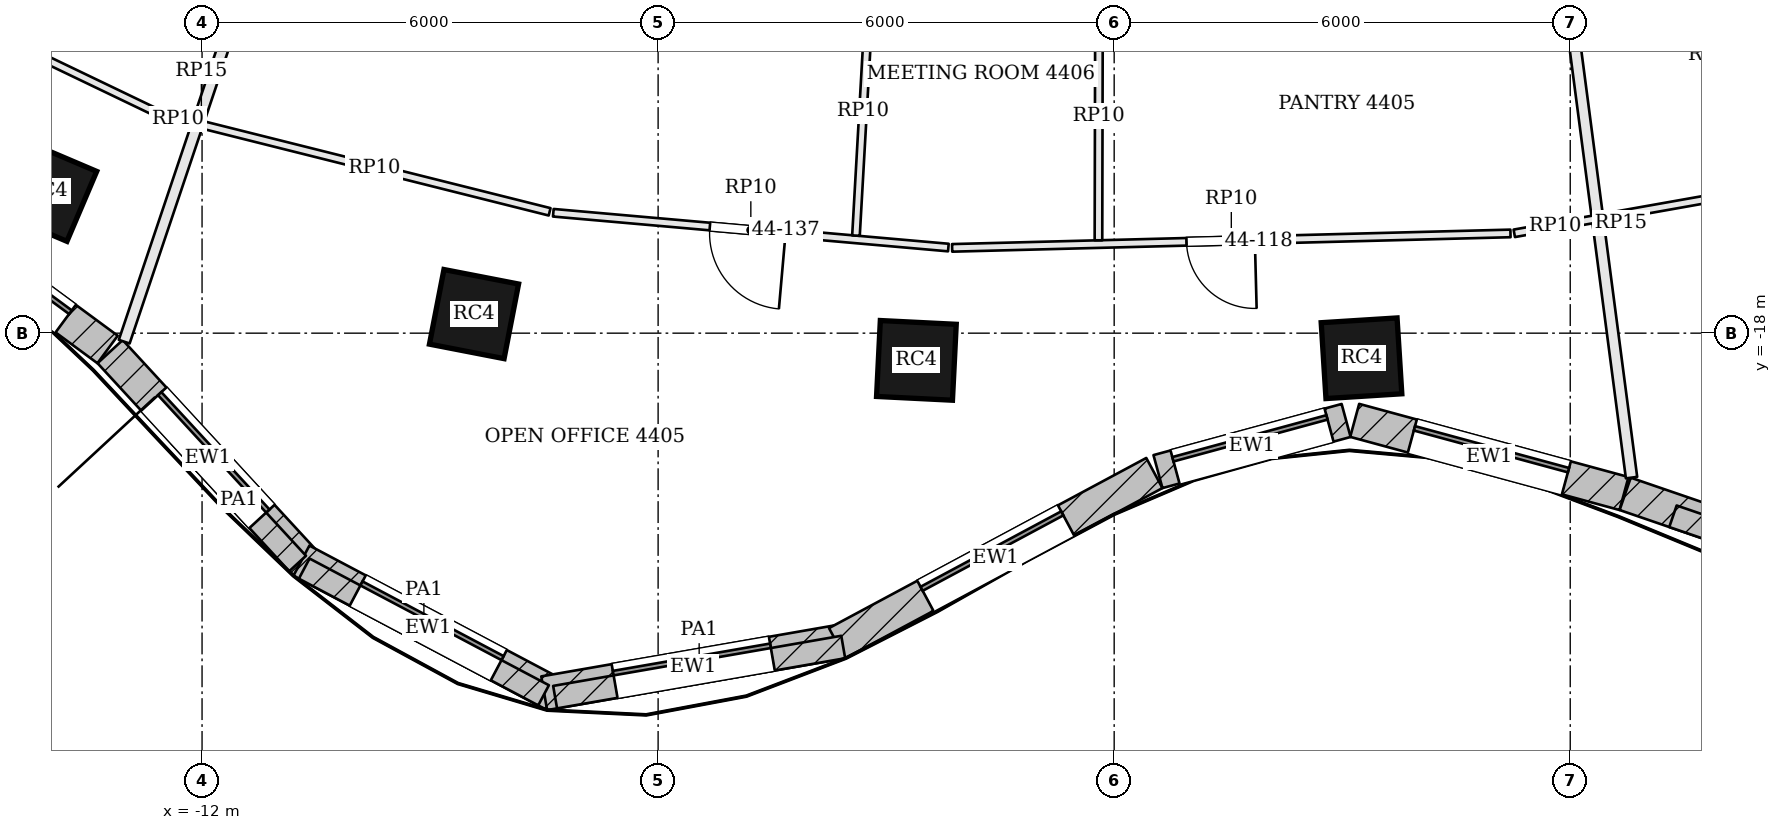
"""IFC4 building model, lengths in metres.
Left out: names, types, materials, properties, quantities, classifications, styles, units other than length and angle.
Written with IfcOpenShell. Run it as: python <this file> out.ifc"""

import sys

from ifc_helpers import new_model, si_unit, direction, frame, frame_2d, origin, origin_2d, place, context, subcontext, project, spatial, rectangle, extrude, element, fill, save


model = new_model("IFC4")
c1 = context("Model", 3, precision=1e-05, world=origin(), true_north=direction((0.0, 1.0)))
c2 = subcontext(c1, "Body", "Model", "MODEL_VIEW")
j1 = project(units=[si_unit("LENGTHUNIT", "METRE"), si_unit("PLANEANGLEUNIT", "RADIAN")], contexts=[c1])
p1 = place(None, origin())
s1 = spatial("IfcSite", under=j1, at=p1, CompositionType="ELEMENT")
p2 = place(p1, origin())
s2 = spatial("IfcBuilding", under=s1, at=p2, CompositionType="ELEMENT")
p3 = place(p2, frame((0.0, 0.0, 181.8)))
s3 = spatial("IfcBuildingStorey", under=s2, at=p3, CompositionType="ELEMENT", Elevation=181.8)
for number, where, z_axis, x_axis in (
    (1, (-14.042, -16.136, 0.0), (0.0, 0.0, 1.0), (0.92, -0.392, 0.0)),
    (2, (-8.422, -17.749, 0.0), (0.0, 0.0, 1.0), (0.982, -0.191, 0.0)),
    (3, (-2.602, -18.358, 0.0), (0.0, 0.0, 1.0), (0.999, -0.05, 0.0)),
    (4, (3.254, -18.33, 0.0), (0.0, 0.0, 1.0), (0.998, 0.063, 0.0)),
):
    element("IfcColumn", number, at=place(p3, frame(where, z_axis=z_axis, x_axis=x_axis)), inside=s3, PredefinedType="COLUMN", context=c2, shape_type="SweptSolid", body=[
        extrude(rectangle(XDim=1.0, YDim=1.0, at=origin_2d()), origin(), (0.0, 0.0, 1.0), 3.9),
    ])
p4 = place(p3, frame((-16.036, -16.158, 0.0), z_axis=(0.0, 0.0, 1.0), x_axis=(0.805181432967, -0.593028549064, 0.0)))
e5 = element("IfcWall", 5, at=p4, inside=s3, PredefinedType="SOLIDWALL", context=c2, shape_type="SweptSolid", body=[
    extrude(rectangle(XDim=3.469, YDim=0.45, at=frame_2d((1.734, 0.0))), origin(), (0.0, 0.0, 1.0), 3.7),
])
p5 = place(p4, frame((0.684, 0.0, 0.9)))
e6 = element("IfcOpeningElement", 6, at=p5, cuts=e5, PredefinedType="OPENING", context=c2, shape_type="SweptSolid", body=[
    extrude(rectangle(XDim=2.1, YDim=2.3, at=frame_2d((1.05, 1.15))), frame((0.0, 0.235, 0.0), z_axis=(0.0, -1.0, 0.0), x_axis=(1.0, 0.0, 0.0)), (0.0, 0.0, 1.0), 0.47),
])
p6 = place(p3, frame((-13.209, -18.243, 0.0), z_axis=(0.0, 0.0, 1.0), x_axis=(0.677612152497, -0.735419452278, 0.0)))
e7 = element("IfcWall", 7, at=p6, inside=s3, PredefinedType="SOLIDWALL", context=c2, shape_type="SweptSolid", body=[
    extrude(rectangle(XDim=3.797, YDim=0.45, at=frame_2d((1.898, 0.0))), origin(), (0.0, 0.0, 1.0), 3.7),
])
p7 = place(p6, frame((0.848, 0.0, 0.9)))
e8 = element("IfcOpeningElement", 8, at=p7, cuts=e7, PredefinedType="OPENING", context=c2, shape_type="SweptSolid", body=[
    extrude(rectangle(XDim=2.1, YDim=2.3, at=frame_2d((1.05, 1.15))), frame((0.0, 0.235, 0.0), z_axis=(0.0, -1.0, 0.0), x_axis=(1.0, 0.0, 0.0)), (0.0, 0.0, 1.0), 0.47),
])
p8 = place(p3, frame((-10.693, -20.993, 0.0), z_axis=(0.0, 0.0, 1.0), x_axis=(0.883817790726, -0.46783128668, 0.0)))
e9 = element("IfcWall", 9, at=p8, inside=s3, PredefinedType="SOLIDWALL", context=c2, shape_type="SweptSolid", body=[
    extrude(rectangle(XDim=3.777, YDim=0.45, at=frame_2d((1.888, 0.0))), origin(), (0.0, 0.0, 1.0), 3.7),
])
p9 = place(p8, frame((0.838, 0.0, 0.9)))
e10 = element("IfcOpeningElement", 10, at=p9, cuts=e9, PredefinedType="OPENING", context=c2, shape_type="SweptSolid", body=[
    extrude(rectangle(XDim=2.1, YDim=2.3, at=frame_2d((1.05, 1.15))), frame((0.0, 0.235, 0.0), z_axis=(0.0, -1.0, 0.0), x_axis=(1.0, 0.0, 0.0)), (0.0, 0.0, 1.0), 0.47),
])
p10 = place(p3, frame((-7.499, -22.737, 0.0), z_axis=(0.0, 0.0, 1.0), x_axis=(0.98521220506, 0.171338585849, 0.0)))
e11 = element("IfcWall", 11, at=p10, inside=s3, PredefinedType="SOLIDWALL", context=c2, shape_type="SweptSolid", body=[
    extrude(rectangle(XDim=3.98, YDim=0.45, at=frame_2d((1.99, 0.0))), origin(), (0.0, 0.0, 1.0), 3.7),
])
p11 = place(p10, frame((0.94, 0.0, 0.9)))
e12 = element("IfcOpeningElement", 12, at=p11, cuts=e11, PredefinedType="OPENING", context=c2, shape_type="SweptSolid", body=[
    extrude(rectangle(XDim=2.1, YDim=2.3, at=frame_2d((1.05, 1.15))), frame((0.0, 0.235, 0.0), z_axis=(0.0, -1.0, 0.0), x_axis=(1.0, 0.0, 0.0)), (0.0, 0.0, 1.0), 0.47),
])
p12 = place(p3, frame((-3.646, -22.079, 0.0), z_axis=(0.0, 0.0, 1.0), x_axis=(0.881279133897, 0.472596115259, 0.0)))
e13 = element("IfcWall", 13, at=p12, inside=s3, PredefinedType="SOLIDWALL", context=c2, shape_type="SweptSolid", body=[
    extrude(rectangle(XDim=4.737, YDim=0.45, at=frame_2d((2.368, 0.0))), origin(), (0.0, 0.0, 1.0), 3.7),
])
p13 = place(p12, frame((1.318, 0.0, 0.9)))
e14 = element("IfcOpeningElement", 14, at=p13, cuts=e13, PredefinedType="OPENING", context=c2, shape_type="SweptSolid", body=[
    extrude(rectangle(XDim=2.1, YDim=2.3, at=frame_2d((1.05, 1.15))), frame((0.0, 0.235, 0.0), z_axis=(0.0, -1.0, 0.0), x_axis=(1.0, 0.0, 0.0)), (0.0, 0.0, 1.0), 0.47),
])
p14 = place(p3, frame((0.576, -19.821, 0.0), z_axis=(0.0, 0.0, 1.0), x_axis=(0.965009398019, 0.262215296532, 0.0)))
e15 = element("IfcWall", 15, at=p14, inside=s3, PredefinedType="SOLIDWALL", context=c2, shape_type="SweptSolid", body=[
    extrude(rectangle(XDim=2.565, YDim=0.45, at=frame_2d((1.283, 0.0))), origin(), (0.0, 0.0, 1.0), 3.7),
])
p15 = place(p14, frame((0.233, 0.0, 0.9)))
e16 = element("IfcOpeningElement", 16, at=p15, cuts=e15, PredefinedType="OPENING", context=c2, shape_type="SweptSolid", body=[
    extrude(rectangle(XDim=2.1, YDim=2.3, at=frame_2d((1.05, 1.15))), frame((0.0, 0.235, 0.0), z_axis=(0.0, -1.0, 0.0), x_axis=(1.0, 0.0, 0.0)), (0.0, 0.0, 1.0), 0.47),
])
p16 = place(p3, frame((3.164, -19.147, 0.0), z_axis=(0.0, 0.0, 1.0), x_axis=(0.965039479998, -0.262104563191, 0.0)))
e17 = element("IfcWall", 17, at=p16, inside=s3, PredefinedType="SOLIDWALL", context=c2, shape_type="SweptSolid", body=[
    extrude(rectangle(XDim=3.672, YDim=0.45, at=frame_2d((1.836, 0.0))), origin(), (0.0, 0.0, 1.0), 3.7),
])
p17 = place(p16, frame((0.786, 0.0, 0.9)))
e18 = element("IfcOpeningElement", 18, at=p17, cuts=e17, PredefinedType="OPENING", context=c2, shape_type="SweptSolid", body=[
    extrude(rectangle(XDim=2.1, YDim=2.3, at=frame_2d((1.05, 1.15))), frame((0.0, 0.235, 0.0), z_axis=(0.0, -1.0, 0.0), x_axis=(1.0, 0.0, 0.0)), (0.0, 0.0, 1.0), 0.47),
])
p18 = place(p3, frame((6.723, -20.114, 0.0), z_axis=(0.0, 0.0, 1.0), x_axis=(0.945947299026, -0.324320377815, 0.0)))
e19 = element("IfcWall", 19, at=p18, inside=s3, PredefinedType="SOLIDWALL", context=c2, shape_type="SweptSolid", body=[
    extrude(rectangle(XDim=4.745, YDim=0.45, at=frame_2d((2.372, 0.0))), origin(), (0.0, 0.0, 1.0), 3.7),
])
p19 = place(p18, frame((1.322, 0.0, 0.9)))
e20 = element("IfcOpeningElement", 20, at=p19, cuts=e19, PredefinedType="OPENING", context=c2, shape_type="SweptSolid", body=[
    extrude(rectangle(XDim=2.1, YDim=2.3, at=frame_2d((1.05, 1.15))), frame((0.0, 0.235, 0.0), z_axis=(0.0, -1.0, 0.0), x_axis=(1.0, 0.0, 0.0)), (0.0, 0.0, 1.0), 0.47),
])
p20 = place(p3, frame((-12.288, -19.354, 3.9), z_axis=(0.0, 0.0, 1.0), x_axis=(0.677603807485, -0.735427141246, 0.0)))
e21 = element("IfcWall", 21, at=p20, inside=s3, PredefinedType="PARAPET", context=c2, shape_type="SweptSolid", body=[
    extrude(rectangle(XDim=2.28, YDim=0.3, at=frame_2d((1.14, 0.0))), origin(), (0.0, 0.0, 1.0), 1.1),
])
p21 = place(p3, frame((-10.656, -21.097, 3.9), z_axis=(0.0, 0.0, 1.0), x_axis=(0.883797916666, -0.467868830439, 0.0)))
e22 = element("IfcWall", 22, at=p21, inside=s3, PredefinedType="PARAPET", context=c2, shape_type="SweptSolid", body=[
    extrude(rectangle(XDim=3.563, YDim=0.3, at=frame_2d((1.781, 0.0))), origin(), (0.0, 0.0, 1.0), 1.1),
])
p22 = place(p3, frame((-7.355, -22.789, 3.9), z_axis=(0.0, 0.0, 1.0), x_axis=(0.985201040548, 0.171402770404, 0.0)))
e23 = element("IfcWall", 23, at=p22, inside=s3, PredefinedType="PARAPET", context=c2, shape_type="SweptSolid", body=[
    extrude(rectangle(XDim=3.847, YDim=0.3, at=frame_2d((1.924, 0.0))), origin(), (0.0, 0.0, 1.0), 1.1),
])
p23 = place(p3, frame((7.352, -20.409, 3.9), z_axis=(0.0, 0.0, 1.0), x_axis=(0.945937789937, -0.32434811171, 0.0)))
e24 = element("IfcWall", 24, at=p23, inside=s3, PredefinedType="PARAPET", context=c2, shape_type="SweptSolid", body=[
    extrude(rectangle(XDim=3.936, YDim=0.3, at=frame_2d((1.968, 0.0))), origin(), (0.0, 0.0, 1.0), 1.1),
])
p24 = place(p3, frame((-13.024, -18.112, 0.0), z_axis=(0.0, 0.0, 1.0), x_axis=(0.319081027508, 0.947727438605, 0.0)))
e25 = element("IfcWall", 25, at=p24, inside=s3, PredefinedType="PARTITIONING", context=c2, shape_type="SweptSolid", body=[
    extrude(rectangle(XDim=6.363, YDim=0.15, at=frame_2d((3.181, 0.0))), origin(), (0.0, 0.0, 1.0), 3.234),
])
p25 = place(p3, frame((6.807, -19.901, 0.0), z_axis=(0.0, 0.0, 1.0), x_axis=(-0.129934596003, 0.991522566945, 0.0)))
e26 = element("IfcWall", 26, at=p25, inside=s3, PredefinedType="PARTITIONING", context=c2, shape_type="SweptSolid", body=[
    extrude(rectangle(XDim=6.766, YDim=0.15, at=frame_2d((3.383, 0.0))), origin(), (0.0, 0.0, 1.0), 3.234),
])
p26 = place(p3, frame((-12.078, -15.238, 0.0), z_axis=(0.0, 0.0, 1.0), x_axis=(-0.970024978464, 0.243005228658, 0.0)))
e27 = element("IfcWall", 27, at=p26, inside=s3, PredefinedType="PARTITIONING", context=c2, shape_type="SweptSolid", body=[
    extrude(rectangle(XDim=0.489, YDim=0.1, at=frame_2d((0.245, 0.0))), origin(), (0.0, 0.0, 1.0), 3.084),
])
p27 = place(p3, frame((-12.597, -15.098, 0.0), z_axis=(0.0, 0.0, 1.0), x_axis=(-0.901514437286, 0.432749025839, 0.0)))
e28 = element("IfcWall", 28, at=p27, inside=s3, PredefinedType="PARTITIONING", context=c2, shape_type="SweptSolid", body=[
    extrude(rectangle(XDim=4.42, YDim=0.1, at=frame_2d((2.21, 0.0))), origin(), (0.0, 0.0, 1.0), 3.084),
])
p28 = place(p3, frame((6.34, -16.496, 0.0), z_axis=(0.0, 0.0, 1.0), x_axis=(-0.984632558058, -0.174638843366, 0.0)))
e29 = element("IfcWall", 29, at=p28, inside=s3, PredefinedType="PARTITIONING", context=c2, shape_type="SweptSolid", body=[
    extrude(rectangle(XDim=1.093, YDim=0.1, at=frame_2d((0.547, 0.0))), origin(), (0.0, 0.0, 1.0), 3.084),
])
p29 = place(p3, frame((5.214, -16.688, 0.0), z_axis=(0.0, 0.0, 1.0), x_axis=(-0.999664981446, -0.025882906921, 0.0)))
e30 = element("IfcWall", 30, at=p29, inside=s3, PredefinedType="PARTITIONING", context=c2, shape_type="SweptSolid", body=[
    extrude(rectangle(XDim=7.348, YDim=0.1, at=frame_2d((3.674, 0.0))), origin(), (0.0, 0.0, 1.0), 3.084),
])
p30 = place(p29, frame((3.364, 0.0, 0.0)))
e31 = element("IfcOpeningElement", 31, at=p30, cuts=e30, PredefinedType="OPENING", context=c2, shape_type="SweptSolid", body=[
    extrude(rectangle(XDim=0.9, YDim=2.1, at=frame_2d((0.45, 1.05))), frame((0.0, 0.06, 0.0), z_axis=(0.0, -1.0, 0.0), x_axis=(1.0, 0.0, 0.0)), (0.0, 0.0, 1.0), 0.12),
])
p31 = place(p3, frame((-2.181, -16.874, 0.0), z_axis=(0.0, 0.0, 1.0), x_axis=(-0.996143934904, 0.087734035321, 0.0)))
e32 = element("IfcWall", 32, at=p31, inside=s3, PredefinedType="PARTITIONING", context=c2, shape_type="SweptSolid", body=[
    extrude(rectangle(XDim=5.218, YDim=0.1, at=frame_2d((2.609, 0.0))), origin(), (0.0, 0.0, 1.0), 3.084),
])
p32 = place(p31, frame((2.15, 0.0, 0.0)))
e33 = element("IfcOpeningElement", 33, at=p32, cuts=e32, PredefinedType="OPENING", context=c2, shape_type="SweptSolid", body=[
    extrude(rectangle(XDim=1.0, YDim=2.1, at=frame_2d((0.5, 1.05))), frame((0.0, 0.06, 0.0), z_axis=(0.0, -1.0, 0.0), x_axis=(1.0, 0.0, 0.0)), (0.0, 0.0, 1.0), 0.12),
])
p33 = place(p3, frame((-7.427, -16.404, 0.0), z_axis=(0.0, 0.0, 1.0), x_axis=(-0.970009433409, 0.243067272783, 0.0)))
e34 = element("IfcWall", 34, at=p33, inside=s3, PredefinedType="PARTITIONING", context=c2, shape_type="SweptSolid", body=[
    extrude(rectangle(XDim=4.754, YDim=0.1, at=frame_2d((2.377, 0.0))), origin(), (0.0, 0.0, 1.0), 3.084),
])
p34 = place(p3, frame((-3.211, -13.445, 0.0), z_axis=(0.0, 0.0, 1.0), x_axis=(-0.056703901856, -0.99839103938, 0.0)))
e35 = element("IfcWall", 35, at=p34, inside=s3, PredefinedType="PARTITIONING", context=c2, shape_type="SweptSolid", body=[
    extrude(rectangle(XDim=3.277, YDim=0.1, at=frame_2d((1.638, 0.0))), origin(), (0.0, 0.0, 1.0), 3.084),
])
p35 = place(p3, frame((-0.199, -13.502, 0.0), z_axis=(0.0, 0.0, 1.0), x_axis=(-0.002309978934, -0.999997331995, 0.0)))
e36 = element("IfcWall", 36, at=p35, inside=s3, PredefinedType="PARTITIONING", context=c2, shape_type="SweptSolid", body=[
    extrude(rectangle(XDim=3.276, YDim=0.1, at=frame_2d((1.638, 0.0))), origin(), (0.0, 0.0, 1.0), 3.084),
])
p36 = place(p3, frame((10.441, -15.769, 0.0), z_axis=(0.0, 0.0, 1.0), x_axis=(-0.984637220861, -0.174612551941, 0.0)))
e37 = element("IfcWall", 37, at=p36, inside=s3, PredefinedType="PARTITIONING", context=c2, shape_type="SweptSolid", body=[
    extrude(rectangle(XDim=4.125, YDim=0.1, at=frame_2d((2.062, 0.0))), origin(), (0.0, 0.0, 1.0), 3.084),
])
p37 = place(p5, origin())
e38 = element("IfcWindow", 38, at=p37, inside=s3, PartitioningType="SINGLE_PANEL", PredefinedType="WINDOW", context=c2, shape_type="SweptSolid", body=[
    extrude(rectangle(XDim=2.1, YDim=2.3, at=frame_2d((1.05, 1.15))), frame((0.0, 0.135, 0.0), z_axis=(0.0, -1.0, 0.0), x_axis=(1.0, 0.0, 0.0)), (0.0, 0.0, 1.0), 0.06),
])
fill(e6, e38)
p38 = place(p7, origin())
e39 = element("IfcWindow", 39, at=p38, inside=s3, PartitioningType="SINGLE_PANEL", PredefinedType="WINDOW", context=c2, shape_type="SweptSolid", body=[
    extrude(rectangle(XDim=2.1, YDim=2.3, at=frame_2d((1.05, 1.15))), frame((0.0, 0.135, 0.0), z_axis=(0.0, -1.0, 0.0), x_axis=(1.0, 0.0, 0.0)), (0.0, 0.0, 1.0), 0.06),
])
fill(e8, e39)
p39 = place(p9, origin())
e40 = element("IfcWindow", 40, at=p39, inside=s3, PartitioningType="SINGLE_PANEL", PredefinedType="WINDOW", context=c2, shape_type="SweptSolid", body=[
    extrude(rectangle(XDim=2.1, YDim=2.3, at=frame_2d((1.05, 1.15))), frame((0.0, 0.135, 0.0), z_axis=(0.0, -1.0, 0.0), x_axis=(1.0, 0.0, 0.0)), (0.0, 0.0, 1.0), 0.06),
])
fill(e10, e40)
p40 = place(p11, origin())
e41 = element("IfcWindow", 41, at=p40, inside=s3, PartitioningType="SINGLE_PANEL", PredefinedType="WINDOW", context=c2, shape_type="SweptSolid", body=[
    extrude(rectangle(XDim=2.1, YDim=2.3, at=frame_2d((1.05, 1.15))), frame((0.0, 0.135, 0.0), z_axis=(0.0, -1.0, 0.0), x_axis=(1.0, 0.0, 0.0)), (0.0, 0.0, 1.0), 0.06),
])
fill(e12, e41)
p41 = place(p13, origin())
e42 = element("IfcWindow", 42, at=p41, inside=s3, PartitioningType="SINGLE_PANEL", PredefinedType="WINDOW", context=c2, shape_type="SweptSolid", body=[
    extrude(rectangle(XDim=2.1, YDim=2.3, at=frame_2d((1.05, 1.15))), frame((0.0, 0.135, 0.0), z_axis=(0.0, -1.0, 0.0), x_axis=(1.0, 0.0, 0.0)), (0.0, 0.0, 1.0), 0.06),
])
fill(e14, e42)
p42 = place(p15, origin())
e43 = element("IfcWindow", 43, at=p42, inside=s3, PartitioningType="SINGLE_PANEL", PredefinedType="WINDOW", context=c2, shape_type="SweptSolid", body=[
    extrude(rectangle(XDim=2.1, YDim=2.3, at=frame_2d((1.05, 1.15))), frame((0.0, 0.135, 0.0), z_axis=(0.0, -1.0, 0.0), x_axis=(1.0, 0.0, 0.0)), (0.0, 0.0, 1.0), 0.06),
])
fill(e16, e43)
p43 = place(p17, origin())
e44 = element("IfcWindow", 44, at=p43, inside=s3, PartitioningType="SINGLE_PANEL", PredefinedType="WINDOW", context=c2, shape_type="SweptSolid", body=[
    extrude(rectangle(XDim=2.1, YDim=2.3, at=frame_2d((1.05, 1.15))), frame((0.0, 0.135, 0.0), z_axis=(0.0, -1.0, 0.0), x_axis=(1.0, 0.0, 0.0)), (0.0, 0.0, 1.0), 0.06),
])
fill(e18, e44)
p44 = place(p30, origin())
e45 = element("IfcDoor", 45, at=p44, inside=s3, OperationType="SINGLE_SWING_LEFT", PredefinedType="DOOR", context=c2, shape_type="SweptSolid", body=[
    extrude(rectangle(XDim=0.9, YDim=2.1, at=frame_2d((0.45, 1.05))), frame((0.0, 0.025, 0.0), z_axis=(0.0, -1.0, 0.0), x_axis=(1.0, 0.0, 0.0)), (0.0, 0.0, 1.0), 0.05),
])
fill(e31, e45)
p45 = place(p32, origin())
e46 = element("IfcDoor", 46, at=p45, inside=s3, OperationType="SINGLE_SWING_LEFT", PredefinedType="DOOR", context=c2, shape_type="SweptSolid", body=[
    extrude(rectangle(XDim=1.0, YDim=2.1, at=frame_2d((0.5, 1.05))), frame((0.0, 0.025, 0.0), z_axis=(0.0, -1.0, 0.0), x_axis=(1.0, 0.0, 0.0)), (0.0, 0.0, 1.0), 0.05),
])
fill(e33, e46)
save(model, sys.argv[1])
